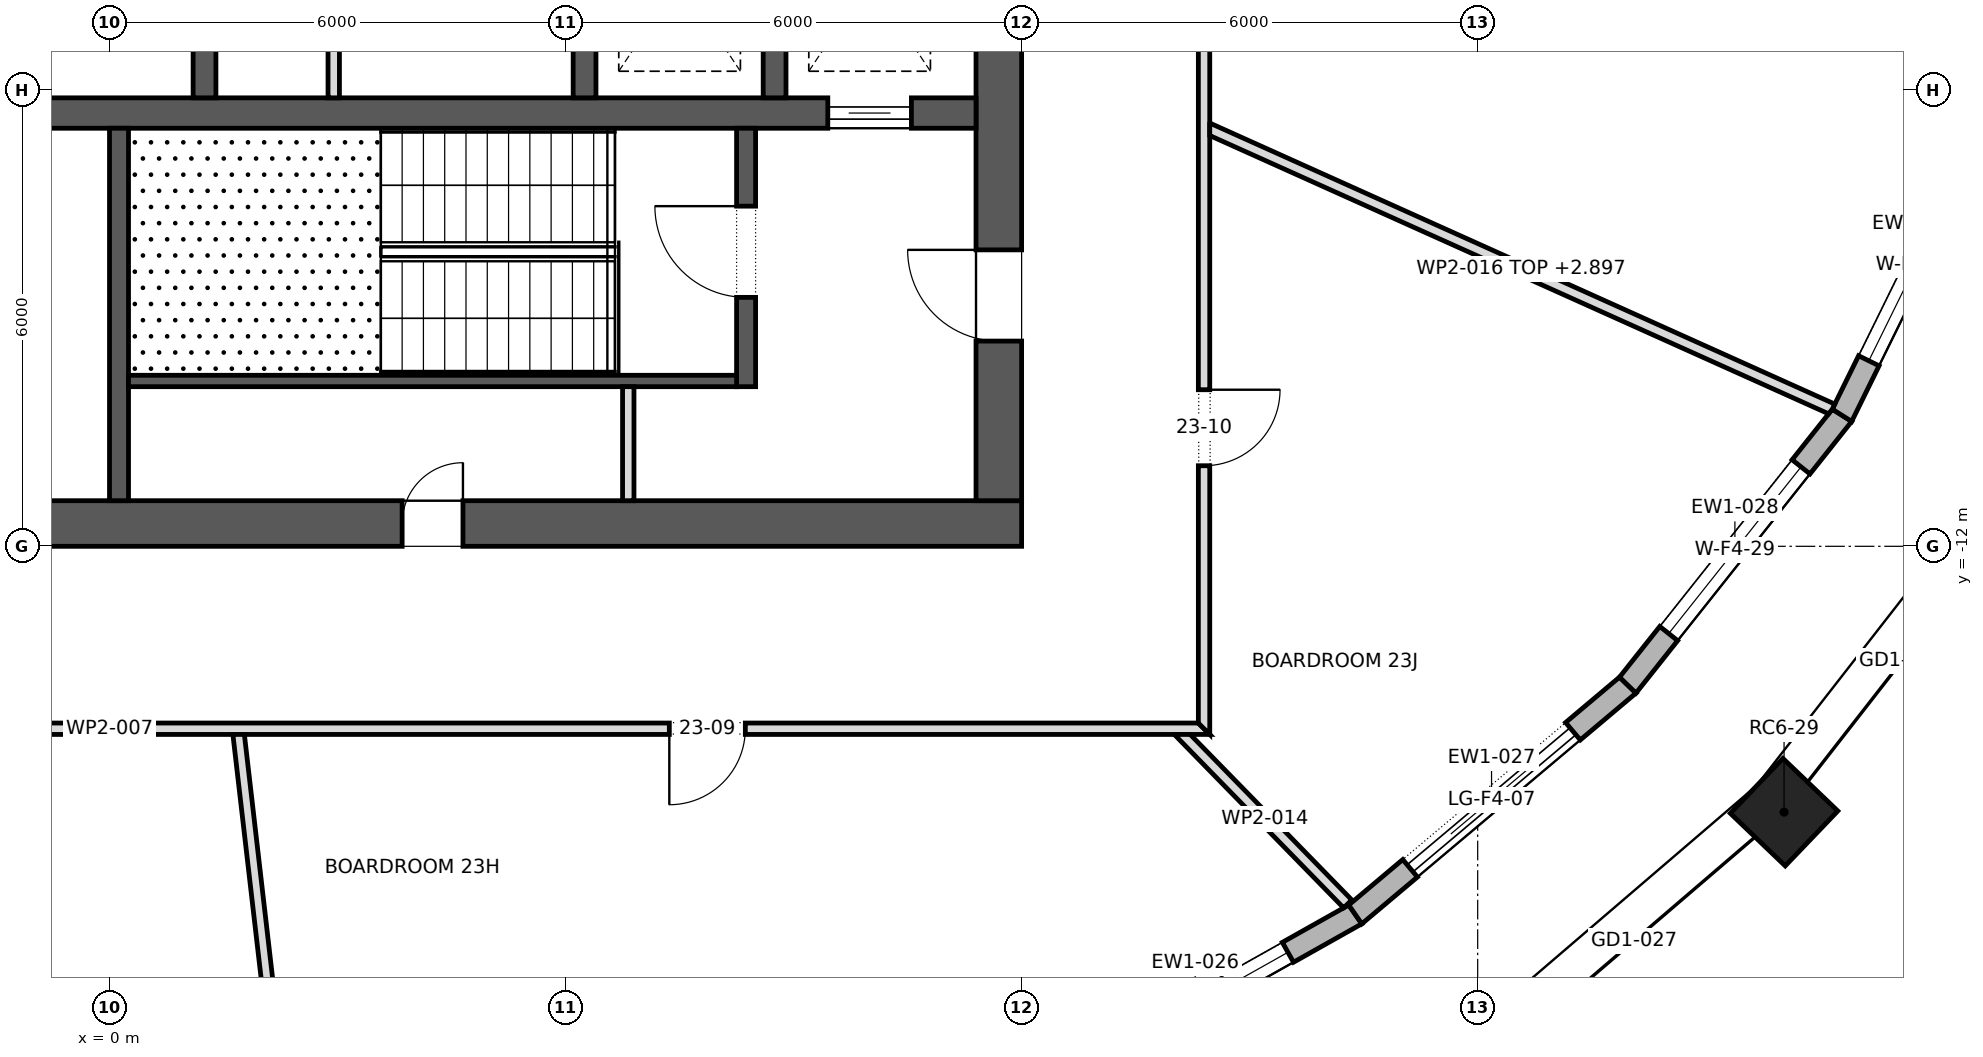
"""IFC4 building model, lengths in metres.
Left out: names, types, materials, properties, quantities, classifications, styles, units other than length and angle.
Written with IfcOpenShell. Run it as: python <this file> out.ifc"""

import sys

from ifc_helpers import new_model, si_unit, direction, frame, frame_2d, origin, origin_2d, place, context, subcontext, project, spatial, polyline, rectangle, outline, extrude, element, fill, save


model = new_model("IFC4")
c1 = context("Model", 3, precision=1e-05, world=origin(), true_north=direction((0.0, 1.0)))
c2 = subcontext(c1, "Body", "Model", "MODEL_VIEW")
j1 = project(units=[si_unit("LENGTHUNIT", "METRE"), si_unit("PLANEANGLEUNIT", "RADIAN")], contexts=[c1])
p1 = place(None, origin())
s1 = spatial("IfcSite", under=j1, at=p1, CompositionType="ELEMENT")
p2 = place(p1, origin())
s2 = spatial("IfcBuilding", under=s1, at=p2, CompositionType="ELEMENT")
p3 = place(p2, frame((0.0, 0.0, 324.3)))
s3 = spatial("IfcBuildingStorey", under=s2, at=p3, CompositionType="ELEMENT", Elevation=324.3)
p4 = place(p3, frame((22.031, -15.497, 0.0), z_axis=(0.0, 0.0, 1.0), x_axis=(0.691578612608, 0.722301199351, 0.0)))
e1 = element("IfcColumn", 1, at=p4, inside=s3, PredefinedType="COLUMN", context=c2, shape_type="SweptSolid", body=[
    extrude(rectangle(XDim=1.0, YDim=1.0, at=origin_2d()), origin(), (0.0, 0.0, 1.0), 4.0),
])
p5 = place(p3, frame((-12.0, -11.7, 0.0), z_axis=(0.0, 0.0, 1.0), x_axis=(1.0, 0.0, 0.0)))
e2 = element("IfcWall", 2, at=p5, inside=s3, PredefinedType="SHEAR", context=c2, shape_type="SweptSolid", body=[
    extrude(rectangle(XDim=24.0, YDim=0.6, at=frame_2d((12.0, 0.0))), origin(), (0.0, 0.0, 1.0), 4.0),
])
p6 = place(p5, frame((9.975, 0.0, 0.0)))
e3 = element("IfcOpeningElement", 3, at=p6, cuts=e2, PredefinedType="OPENING", context=c2, shape_type="SweptSolid", body=[
    extrude(rectangle(XDim=0.9, YDim=2.1, at=frame_2d((0.45, 1.05))), frame((0.0, 0.312, 0.0), z_axis=(0.0, -1.0, 0.0), x_axis=(1.0, 0.0, 0.0)), (0.0, 0.0, 1.0), 0.624),
])
p7 = place(p5, frame((4.6, 0.0, 0.0)))
e4 = element("IfcOpeningElement", 4, at=p7, cuts=e2, PredefinedType="OPENING", context=c2, shape_type="SweptSolid", body=[
    extrude(rectangle(XDim=0.8, YDim=2.1, at=frame_2d((0.4, 1.05))), frame((0.0, 0.312, 0.0), z_axis=(0.0, -1.0, 0.0), x_axis=(1.0, 0.0, 0.0)), (0.0, 0.0, 1.0), 0.624),
])
p8 = place(p5, frame((7.0, 0.0, 0.0)))
e5 = element("IfcOpeningElement", 5, at=p8, cuts=e2, PredefinedType="OPENING", context=c2, shape_type="SweptSolid", body=[
    extrude(rectangle(XDim=0.8, YDim=2.1, at=frame_2d((0.4, 1.05))), frame((0.0, 0.312, 0.0), z_axis=(0.0, -1.0, 0.0), x_axis=(1.0, 0.0, 0.0)), (0.0, 0.0, 1.0), 0.624),
])
p9 = place(p5, frame((15.85, 0.0, 0.0)))
e6 = element("IfcOpeningElement", 6, at=p9, cuts=e2, PredefinedType="OPENING", context=c2, shape_type="SweptSolid", body=[
    extrude(rectangle(XDim=0.8, YDim=2.1, at=frame_2d((0.4, 1.05))), frame((0.0, 0.312, 0.0), z_axis=(0.0, -1.0, 0.0), x_axis=(1.0, 0.0, 0.0)), (0.0, 0.0, 1.0), 0.624),
])
p10 = place(p3, frame((11.7, -11.4, 0.0), z_axis=(0.0, 0.0, 1.0), x_axis=(0.0, 1.0, 0.0)))
e7 = element("IfcWall", 7, at=p10, inside=s3, PredefinedType="SHEAR", context=c2, shape_type="SweptSolid", body=[
    extrude(rectangle(XDim=22.8, YDim=0.6, at=frame_2d((11.4, 0.0))), origin(), (0.0, 0.0, 1.0), 4.0),
])
p11 = place(p10, frame((10.2, 0.0, 0.0)))
e8 = element("IfcOpeningElement", 8, at=p11, cuts=e7, PredefinedType="OPENING", context=c2, shape_type="SweptSolid", body=[
    extrude(rectangle(XDim=2.4, YDim=2.1, at=frame_2d((1.2, 1.05))), frame((0.0, 0.312, 0.0), z_axis=(0.0, -1.0, 0.0), x_axis=(1.0, 0.0, 0.0)), (0.0, 0.0, 1.0), 0.624),
])
p12 = place(p10, frame((19.5, 0.0, 0.0)))
e9 = element("IfcOpeningElement", 9, at=p12, cuts=e7, PredefinedType="OPENING", context=c2, shape_type="SweptSolid", body=[
    extrude(rectangle(XDim=1.2, YDim=2.1, at=frame_2d((0.6, 1.05))), frame((0.0, 0.312, 0.0), z_axis=(0.0, -1.0, 0.0), x_axis=(1.0, 0.0, 0.0)), (0.0, 0.0, 1.0), 0.624),
])
p13 = place(p10, frame((2.1, 0.0, 0.0)))
e10 = element("IfcOpeningElement", 10, at=p13, cuts=e7, PredefinedType="OPENING", context=c2, shape_type="SweptSolid", body=[
    extrude(rectangle(XDim=1.2, YDim=2.1, at=frame_2d((0.6, 1.05))), frame((0.0, 0.312, 0.0), z_axis=(0.0, -1.0, 0.0), x_axis=(1.0, 0.0, 0.0)), (0.0, 0.0, 1.0), 0.624),
])
p14 = place(p3, frame((-11.4, -6.3, 0.0), z_axis=(0.0, 0.0, 1.0), x_axis=(1.0, 0.0, 0.0)))
e11 = element("IfcWall", 11, at=p14, inside=s3, PredefinedType="SHEAR", context=c2, shape_type="SweptSolid", body=[
    extrude(rectangle(XDim=22.8, YDim=0.4, at=frame_2d((11.4, 0.0))), origin(), (0.0, 0.0, 1.0), 4.0),
])
p15 = place(p14, frame((20.85, 0.0, 0.0)))
e12 = element("IfcOpeningElement", 12, at=p15, cuts=e11, PredefinedType="OPENING", context=c2, shape_type="SweptSolid", body=[
    extrude(rectangle(XDim=1.1, YDim=2.1, at=frame_2d((0.55, 1.05))), frame((0.0, 0.212, 0.0), z_axis=(0.0, -1.0, 0.0), x_axis=(1.0, 0.0, 0.0)), (0.0, 0.0, 1.0), 0.424),
])
for number, where, z_axis, x_axis in (
    (13, (1.25, -6.1, 0.0), (0.0, 0.0, 1.0), (0.0, 1.0, 0.0)),
    (14, (6.25, -6.1, 0.0), (0.0, 0.0, 1.0), (0.0, 1.0, 0.0)),
    (15, (8.75, -6.1, 0.0), (0.0, 0.0, 1.0), (0.0, 1.0, 0.0)),
):
    element("IfcWall", number, at=place(p3, frame(where, z_axis=z_axis, x_axis=x_axis)), inside=s3, PredefinedType="SHEAR", context=c2, shape_type="SweptSolid", body=[
        extrude(rectangle(XDim=2.9, YDim=0.3, at=frame_2d((1.45, 0.0))), origin(), (0.0, 0.0, 1.0), 4.0),
    ])
p16 = place(p3, frame((12.177, -19.212, 0.0), z_axis=(0.0, 0.0, 1.0), x_axis=(0.871651071333, 0.49012693238, 0.0)))
e16 = element("IfcWall", 16, at=p16, inside=s3, PredefinedType="STANDARD", context=c2, shape_type="SweptSolid", body=[
    extrude(outline(polyline([(-0.013, -0.15), (4.847, -0.15), (4.819, 0.15), (0.013, 0.15), (-0.013, -0.15)])), origin(), (0.0, 0.0, 1.0), 3.65),
])
p17 = place(p16, frame((1.017, 0.0, 0.6)))
e17 = element("IfcOpeningElement", 17, at=p17, cuts=e16, PredefinedType="OPENING", context=c2, shape_type="SweptSolid", body=[
    extrude(rectangle(XDim=2.8, YDim=2.65, at=frame_2d((1.4, 1.325))), frame((0.0, 0.162, 0.0), z_axis=(0.0, -1.0, 0.0), x_axis=(1.0, 0.0, 0.0)), (0.0, 0.0, 1.0), 0.324),
])
p18 = place(p3, frame((16.39, -16.843, 0.0), z_axis=(0.0, 0.0, 1.0), x_axis=(0.765128700347, 0.643877373344, 0.0)))
e18 = element("IfcWall", 18, at=p18, inside=s3, PredefinedType="STANDARD", context=c2, shape_type="SweptSolid", body=[
    extrude(outline(polyline([(-0.014, -0.15), (4.701, -0.15), (4.67, 0.15), (0.014, 0.15), (-0.014, -0.15)])), origin(), (0.0, 0.0, 1.0), 3.65),
])
p19 = place(p18, frame((0.943, 0.0, 0.0)))
e19 = element("IfcOpeningElement", 19, at=p19, cuts=e18, PredefinedType="OPENING", context=c2, shape_type="SweptSolid", body=[
    extrude(rectangle(XDim=2.8, YDim=3.25, at=frame_2d((1.4, 1.625))), frame((0.0, 0.162, 0.0), z_axis=(0.0, -1.0, 0.0), x_axis=(1.0, 0.0, 0.0)), (0.0, 0.0, 1.0), 0.324),
])
p20 = place(p3, frame((19.975, -13.826, 0.0), z_axis=(0.0, 0.0, 1.0), x_axis=(0.621800530555, 0.783175650925, 0.0)))
e20 = element("IfcWall", 20, at=p20, inside=s3, PredefinedType="STANDARD", context=c2, shape_type="SweptSolid", body=[
    extrude(outline(polyline([(-0.015, -0.15), (4.549, -0.15), (4.516, 0.15), (0.015, 0.15), (-0.015, -0.15)])), origin(), (0.0, 0.0, 1.0), 3.65),
])
p21 = place(p20, frame((0.866, 0.0, 0.6)))
e21 = element("IfcOpeningElement", 21, at=p21, cuts=e20, PredefinedType="OPENING", context=c2, shape_type="SweptSolid", body=[
    extrude(rectangle(XDim=2.8, YDim=2.65, at=frame_2d((1.4, 1.325))), frame((0.0, 0.162, 0.0), z_axis=(0.0, -1.0, 0.0), x_axis=(1.0, 0.0, 0.0)), (0.0, 0.0, 1.0), 0.324),
])
p22 = place(p3, frame((22.793, -10.276, 0.0), z_axis=(0.0, 0.0, 1.0), x_axis=(0.441610485853, 0.897206876247, 0.0)))
e22 = element("IfcWall", 22, at=p22, inside=s3, PredefinedType="STANDARD", context=c2, shape_type="SweptSolid", body=[
    extrude(outline(polyline([(-0.016, -0.15), (4.416, -0.15), (4.382, 0.15), (0.016, 0.15), (-0.016, -0.15)])), origin(), (0.0, 0.0, 1.0), 3.65),
])
p23 = place(p22, frame((0.8, 0.0, 0.6)))
e23 = element("IfcOpeningElement", 23, at=p23, cuts=e22, PredefinedType="OPENING", context=c2, shape_type="SweptSolid", body=[
    extrude(rectangle(XDim=2.8, YDim=2.65, at=frame_2d((1.4, 1.325))), frame((0.0, 0.162, 0.0), z_axis=(0.0, -1.0, 0.0), x_axis=(1.0, 0.0, 0.0)), (0.0, 0.0, 1.0), 0.324),
])
p24 = place(p3, frame((0.125, -11.4, 0.0), z_axis=(0.0, 0.0, 1.0), x_axis=(0.0, 1.0, 0.0)))
e24 = element("IfcWall", 24, at=p24, inside=s3, PredefinedType="SHEAR", context=c2, shape_type="SweptSolid", body=[
    extrude(rectangle(XDim=4.9, YDim=0.25, at=frame_2d((2.45, 0.0))), origin(), (0.0, 0.0, 1.0), 3.65),
])
p25 = place(p3, frame((8.375, -9.9, 0.0), z_axis=(0.0, 0.0, 1.0), x_axis=(0.0, 1.0, 0.0)))
e25 = element("IfcWall", 25, at=p25, inside=s3, PredefinedType="SHEAR", context=c2, shape_type="SweptSolid", body=[
    extrude(rectangle(XDim=3.4, YDim=0.25, at=frame_2d((1.7, 0.0))), origin(), (0.0, 0.0, 1.0), 3.65),
])
p26 = place(p25, frame((1.175, 0.0, 0.0)))
e26 = element("IfcOpeningElement", 26, at=p26, cuts=e25, PredefinedType="OPENING", context=c2, shape_type="SweptSolid", body=[
    extrude(rectangle(XDim=1.2, YDim=2.1, at=frame_2d((0.6, 1.05))), frame((0.0, 0.137, 0.0), z_axis=(0.0, -1.0, 0.0), x_axis=(1.0, 0.0, 0.0)), (0.0, 0.0, 1.0), 0.274),
])
p27 = place(p3, frame((0.25, -9.825, 0.0), z_axis=(0.0, 0.0, 1.0), x_axis=(1.0, 0.0, 0.0)))
e27 = element("IfcWall", 27, at=p27, inside=s3, PredefinedType="SHEAR", context=c2, shape_type="SweptSolid", body=[
    extrude(rectangle(XDim=8.0, YDim=0.15, at=frame_2d((4.0, 0.0))), origin(), (0.0, 0.0, 1.0), 3.65),
])
p28 = place(p3, frame((6.825, -11.4, 0.0), z_axis=(0.0, 0.0, 1.0), x_axis=(0.0, 1.0, 0.0)))
e28 = element("IfcWall", 28, at=p28, inside=s3, PredefinedType="PARTITIONING", context=c2, shape_type="SweptSolid", body=[
    extrude(rectangle(XDim=1.5, YDim=0.15, at=frame_2d((0.75, 0.0))), origin(), (0.0, 0.0, 1.0), 3.65),
])
p29 = place(p3, frame((2.95, -6.1, 0.0), z_axis=(0.0, 0.0, 1.0), x_axis=(0.0, 1.0, 0.0)))
e29 = element("IfcWall", 29, at=p29, inside=s3, PredefinedType="PARTITIONING", context=c2, shape_type="SweptSolid", body=[
    extrude(rectangle(XDim=2.9, YDim=0.15, at=frame_2d((1.45, 0.0))), origin(), (0.0, 0.0, 1.0), 3.65),
])
p30 = place(p3, frame((-14.475, -14.4, 0.0), z_axis=(0.0, 0.0, 1.0), x_axis=(1.0, 0.0, 0.0)))
e30 = element("IfcWall", 30, at=p30, inside=s3, PredefinedType="PARTITIONING", context=c2, shape_type="SweptSolid", body=[
    extrude(outline(polyline([(0.0, -0.075), (1.93, -0.075), (3.86, -0.075), (5.79, -0.075), (7.72, -0.075), (9.65, -0.075), (11.58, -0.075), (13.51, -0.075), (15.44, -0.075), (17.37, -0.075), (19.3, -0.075), (21.23, -0.075), (23.16, -0.075), (25.09, -0.075), (27.02, -0.075), (28.95, -0.075), (28.8, 0.075), (26.89, 0.075), (24.98, 0.075), (23.07, 0.075), (21.16, 0.075), (19.25, 0.075), (17.34, 0.075), (15.43, 0.075), (13.52, 0.075), (11.61, 0.075), (9.7, 0.075), (7.79, 0.075), (5.88, 0.075), (3.97, 0.075), (2.06, 0.075), (0.15, 0.075), (0.0, -0.075)])), origin(), (0.0, 0.0, 1.0), 3.65),
])
p31 = place(p30, frame((10.245, 0.0, 0.0)))
e31 = element("IfcOpeningElement", 31, at=p31, cuts=e30, PredefinedType="OPENING", context=c2, shape_type="SweptSolid", body=[
    extrude(rectangle(XDim=1.0, YDim=2.1, at=frame_2d((0.5, 1.05))), frame((0.0, 0.087, 0.0), z_axis=(0.0, -1.0, 0.0), x_axis=(1.0, 0.0, 0.0)), (0.0, 0.0, 1.0), 0.174),
])
p32 = place(p30, frame((21.84, 0.0, 0.0)))
e32 = element("IfcOpeningElement", 32, at=p32, cuts=e30, PredefinedType="OPENING", context=c2, shape_type="SweptSolid", body=[
    extrude(rectangle(XDim=1.0, YDim=2.1, at=frame_2d((0.5, 1.05))), frame((0.0, 0.087, 0.0), z_axis=(0.0, -1.0, 0.0), x_axis=(1.0, 0.0, 0.0)), (0.0, 0.0, 1.0), 0.174),
])
p33 = place(p3, frame((1.698, -14.467, 0.0), z_axis=(0.0, 0.0, 1.0), x_axis=(0.115131681879, -0.993350238248, 0.0)))
e33 = element("IfcWall", 33, at=p33, inside=s3, PredefinedType="PARTITIONING", context=c2, shape_type="SweptSolid", body=[
    extrude(outline(polyline([(0.0, -0.075), (1.774, -0.075), (3.548, -0.075), (5.322, -0.075), (7.096, -0.075), (7.102, -0.031), (7.102, 0.075), (5.331, 0.075), (3.559, 0.075), (1.788, 0.075), (0.017, 0.075), (0.0, -0.073), (0.0, -0.075)])), origin(), (0.0, 0.0, 1.0), 3.1),
])
p34 = place(p3, frame((14.062, -14.423, 0.0), z_axis=(0.0, 0.0, 1.0), x_axis=(0.698596457998, -0.715515890021, 0.0)))
e34 = element("IfcWall", 34, at=p34, inside=s3, PredefinedType="PARTITIONING", context=c2, shape_type="SweptSolid", body=[
    extrude(outline(polyline([(0.0, -0.075), (1.594, -0.075), (3.189, -0.075), (3.189, -0.075), (3.189, 0.075), (1.667, 0.075), (0.146, 0.075), (0.0, -0.075), (0.0, -0.075)])), origin(), (0.0, 0.0, 1.0), 3.65),
])
p35 = place(p3, frame((14.4, -14.475, 0.0), z_axis=(0.0, 0.0, 1.0), x_axis=(0.0, 1.0, 0.0)))
e35 = element("IfcWall", 35, at=p35, inside=s3, PredefinedType="PARTITIONING", context=c2, shape_type="SweptSolid", body=[
    extrude(outline(polyline([(0.0, -0.075), (1.93, -0.075), (3.86, -0.075), (5.79, -0.075), (7.72, -0.075), (9.65, -0.075), (11.58, -0.075), (13.51, -0.075), (15.44, -0.075), (17.37, -0.075), (19.3, -0.075), (21.23, -0.075), (23.16, -0.075), (25.09, -0.075), (27.02, -0.075), (28.95, -0.075), (28.8, 0.075), (26.89, 0.075), (24.98, 0.075), (23.07, 0.075), (21.16, 0.075), (19.25, 0.075), (17.34, 0.075), (15.43, 0.075), (13.52, 0.075), (11.61, 0.075), (9.7, 0.075), (7.79, 0.075), (5.88, 0.075), (3.97, 0.075), (2.06, 0.075), (0.15, 0.075), (0.0, -0.075)])), origin(), (0.0, 0.0, 1.0), 3.65),
])
p36 = place(p35, frame((24.415, 0.0, 0.0)))
e36 = element("IfcOpeningElement", 36, at=p36, cuts=e35, PredefinedType="OPENING", context=c2, shape_type="SweptSolid", body=[
    extrude(rectangle(XDim=1.0, YDim=2.1, at=frame_2d((0.5, 1.05))), frame((0.0, 0.087, 0.0), z_axis=(0.0, -1.0, 0.0), x_axis=(1.0, 0.0, 0.0)), (0.0, 0.0, 1.0), 0.174),
])
p37 = place(p35, frame((3.535, 0.0, 0.0)))
e37 = element("IfcOpeningElement", 37, at=p37, cuts=e35, PredefinedType="OPENING", context=c2, shape_type="SweptSolid", body=[
    extrude(rectangle(XDim=1.0, YDim=2.1, at=frame_2d((0.5, 1.05))), frame((0.0, 0.087, 0.0), z_axis=(0.0, -1.0, 0.0), x_axis=(1.0, 0.0, 0.0)), (0.0, 0.0, 1.0), 0.174),
])
p38 = place(p35, frame((10.14, 0.0, 0.0)))
e38 = element("IfcOpeningElement", 38, at=p38, cuts=e35, PredefinedType="OPENING", context=c2, shape_type="SweptSolid", body=[
    extrude(rectangle(XDim=1.0, YDim=2.1, at=frame_2d((0.5, 1.05))), frame((0.0, 0.087, 0.0), z_axis=(0.0, -1.0, 0.0), x_axis=(1.0, 0.0, 0.0)), (0.0, 0.0, 1.0), 0.174),
])
p39 = place(p35, frame((16.62, 0.0, 0.0)))
e39 = element("IfcOpeningElement", 39, at=p39, cuts=e35, PredefinedType="OPENING", context=c2, shape_type="SweptSolid", body=[
    extrude(rectangle(XDim=1.0, YDim=2.1, at=frame_2d((0.5, 1.05))), frame((0.0, 0.087, 0.0), z_axis=(0.0, -1.0, 0.0), x_axis=(1.0, 0.0, 0.0)), (0.0, 0.0, 1.0), 0.174),
])
p40 = place(p3, frame((14.445, -6.5, 0.0), z_axis=(0.0, 0.0, 1.0), x_axis=(0.912043070278, -0.410094425662, 0.0)))
e40 = element("IfcWall", 40, at=p40, inside=s3, PredefinedType="PARTITIONING", context=c2, shape_type="SweptSolid", body=[
    extrude(outline(polyline([(0.067, -0.075), (1.853, -0.075), (3.638, -0.075), (5.423, -0.075), (7.209, -0.075), (8.994, -0.075), (9.013, 0.001), (9.016, 0.066), (9.016, 0.075), (7.212, 0.075), (5.409, 0.075), (3.606, 0.075), (1.803, 0.075), (0.0, 0.075), (0.0, 0.074), (0.067, -0.075)])), origin(), (0.0, 0.0, 1.0), 2.897),
])
p41 = place(p17, origin())
e41 = element("IfcWindow", 41, at=p41, inside=s3, PartitioningType="DOUBLE_PANEL_VERTICAL", PredefinedType="WINDOW", context=c2, shape_type="SweptSolid", body=[
    extrude(rectangle(XDim=2.8, YDim=2.65, at=frame_2d((1.4, 1.325))), frame((0.0, 0.03, 0.0), z_axis=(0.0, -1.0, 0.0), x_axis=(1.0, 0.0, 0.0)), (0.0, 0.0, 1.0), 0.06),
])
fill(e17, e41)
p42 = place(p19, origin())
e42 = element("IfcDoor", 42, at=p42, inside=s3, OperationType="DOUBLE_DOOR_SLIDING", PredefinedType="DOOR", context=c2, shape_type="SweptSolid", body=[
    extrude(rectangle(XDim=2.8, YDim=3.25, at=frame_2d((1.4, 1.625))), frame((0.0, 0.025, 0.0), z_axis=(0.0, -1.0, 0.0), x_axis=(1.0, 0.0, 0.0)), (0.0, 0.0, 1.0), 0.05),
])
fill(e19, e42)
p43 = place(p21, origin())
e43 = element("IfcWindow", 43, at=p43, inside=s3, PartitioningType="DOUBLE_PANEL_VERTICAL", PredefinedType="WINDOW", context=c2, shape_type="SweptSolid", body=[
    extrude(rectangle(XDim=2.8, YDim=2.65, at=frame_2d((1.4, 1.325))), frame((0.0, 0.03, 0.0), z_axis=(0.0, -1.0, 0.0), x_axis=(1.0, 0.0, 0.0)), (0.0, 0.0, 1.0), 0.06),
])
fill(e21, e43)
p44 = place(p23, origin())
e44 = element("IfcWindow", 44, at=p44, inside=s3, PartitioningType="DOUBLE_PANEL_VERTICAL", PredefinedType="WINDOW", context=c2, shape_type="SweptSolid", body=[
    extrude(rectangle(XDim=2.8, YDim=2.65, at=frame_2d((1.4, 1.325))), frame((0.0, 0.03, 0.0), z_axis=(0.0, -1.0, 0.0), x_axis=(1.0, 0.0, 0.0)), (0.0, 0.0, 1.0), 0.06),
])
fill(e23, e44)
p45 = place(p15, origin())
e45 = element("IfcDoor", 45, at=p45, inside=s3, OperationType="SLIDING_TO_LEFT", PredefinedType="DOOR", context=c2, shape_type="SweptSolid", body=[
    extrude(rectangle(XDim=1.1, YDim=2.1, at=frame_2d((0.55, 1.05))), frame((0.0, 0.025, 0.0), z_axis=(0.0, -1.0, 0.0), x_axis=(1.0, 0.0, 0.0)), (0.0, 0.0, 1.0), 0.05),
])
fill(e12, e45)
p46 = place(p26, origin())
e46 = element("IfcDoor", 46, at=p46, inside=s3, OperationType="SINGLE_SWING_LEFT", PredefinedType="DOOR", context=c2, shape_type="SweptSolid", body=[
    extrude(rectangle(XDim=1.2, YDim=2.1, at=frame_2d((0.6, 1.05))), frame((0.0, 0.025, 0.0), z_axis=(0.0, -1.0, 0.0), x_axis=(1.0, 0.0, 0.0)), (0.0, 0.0, 1.0), 0.05),
])
fill(e26, e46)
p47 = place(p13, origin())
e47 = element("IfcDoor", 47, at=p47, inside=s3, OperationType="SINGLE_SWING_LEFT", PredefinedType="DOOR", context=c2, shape_type="SweptSolid", body=[
    extrude(rectangle(XDim=1.2, YDim=2.1, at=frame_2d((0.6, 1.05))), frame((0.0, 0.025, 0.0), z_axis=(0.0, -1.0, 0.0), x_axis=(1.0, 0.0, 0.0)), (0.0, 0.0, 1.0), 0.05),
])
fill(e10, e47)
p48 = place(p9, origin())
e48 = element("IfcDoor", 48, at=p48, inside=s3, OperationType="SINGLE_SWING_LEFT", PredefinedType="DOOR", context=c2, shape_type="SweptSolid", body=[
    extrude(rectangle(XDim=0.8, YDim=2.1, at=frame_2d((0.4, 1.05))), frame((0.0, 0.025, 0.0), z_axis=(0.0, -1.0, 0.0), x_axis=(1.0, 0.0, 0.0)), (0.0, 0.0, 1.0), 0.05),
])
fill(e6, e48)
p49 = place(p32, frame((1.0, 0.0, 0.0), z_axis=(0.0, 0.0, 1.0), x_axis=(-1.0, 0.0, 0.0)))
e49 = element("IfcDoor", 49, at=p49, inside=s3, OperationType="SINGLE_SWING_LEFT", PredefinedType="DOOR", context=c2, shape_type="SweptSolid", body=[
    extrude(rectangle(XDim=1.0, YDim=2.1, at=frame_2d((0.5, 1.05))), frame((0.0, 0.025, 0.0), z_axis=(0.0, -1.0, 0.0), x_axis=(1.0, 0.0, 0.0)), (0.0, 0.0, 1.0), 0.05),
])
fill(e32, e49)
p50 = place(p37, frame((1.0, 0.0, 0.0), z_axis=(0.0, 0.0, 1.0), x_axis=(-1.0, 0.0, 0.0)))
e50 = element("IfcDoor", 50, at=p50, inside=s3, OperationType="SINGLE_SWING_RIGHT", PredefinedType="DOOR", context=c2, shape_type="SweptSolid", body=[
    extrude(rectangle(XDim=1.0, YDim=2.1, at=frame_2d((0.5, 1.05))), frame((0.0, 0.025, 0.0), z_axis=(0.0, -1.0, 0.0), x_axis=(1.0, 0.0, 0.0)), (0.0, 0.0, 1.0), 0.05),
])
fill(e37, e50)
save(model, sys.argv[1])
